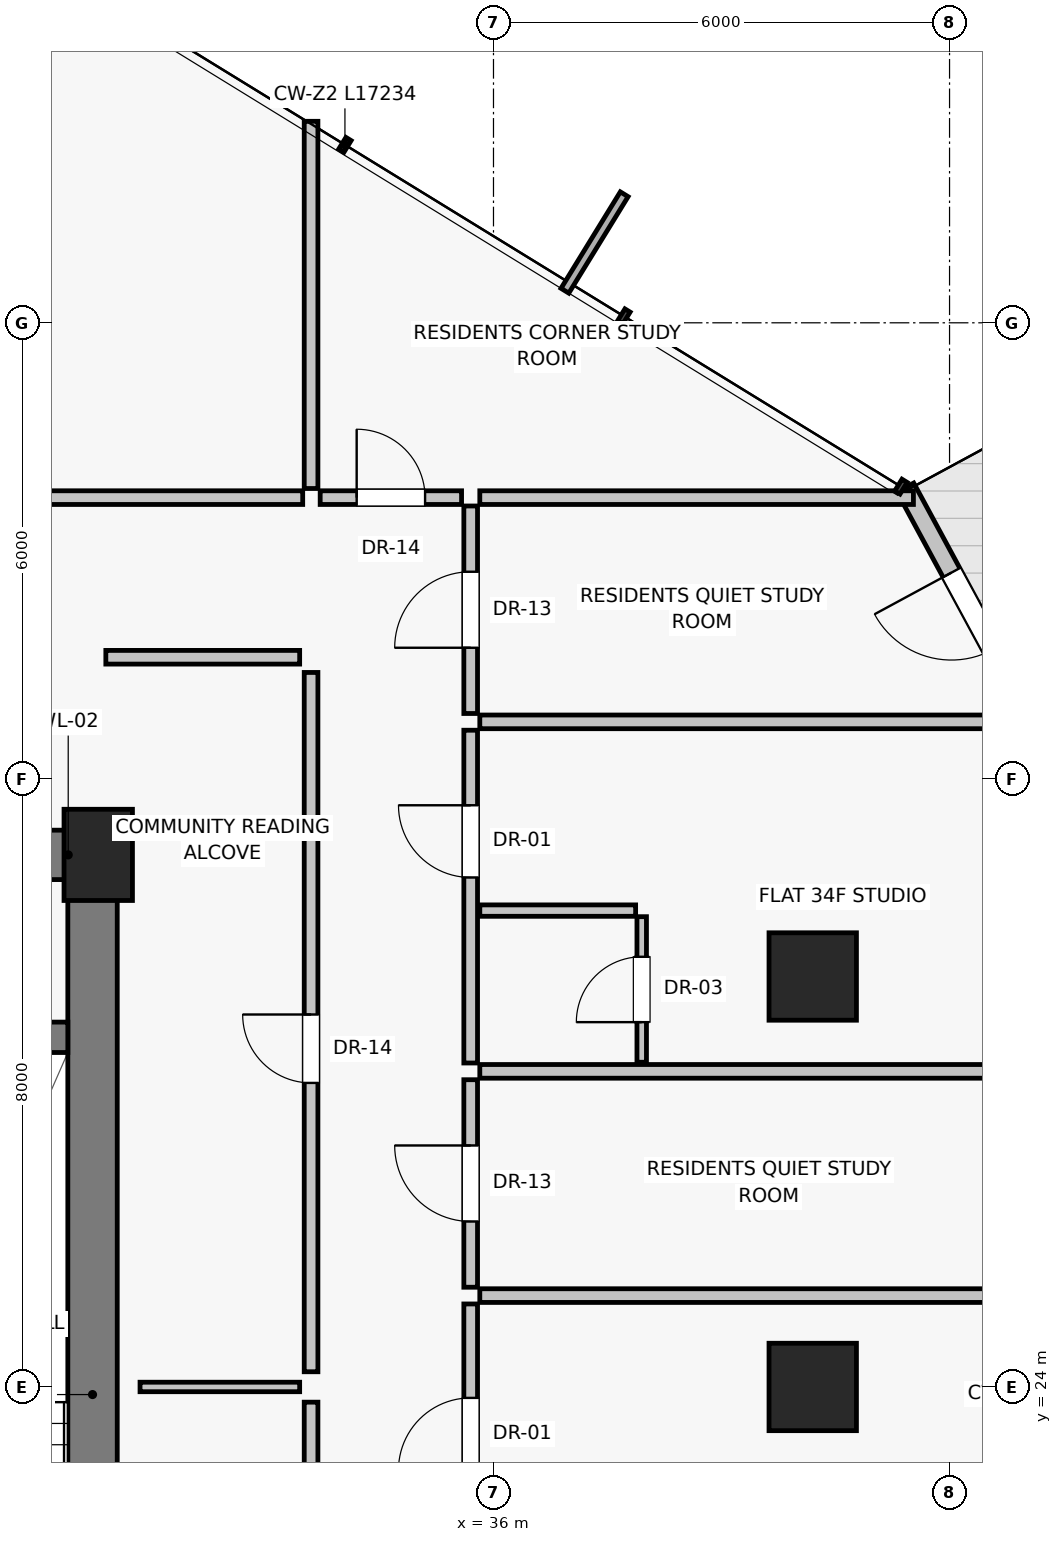
"""IFC4 building model, lengths in metres.
Left out: names, types, materials, properties, quantities, classifications, styles, units other than length and angle.
Written with IfcOpenShell. Run it as: python <this file> out.ifc"""

import sys

from ifc_helpers import new_model, si_unit, direction, frame, frame_2d, origin, origin_2d, place, context, subcontext, project, spatial, rectangle, extrude, source, transform, mapped, element, fill, save


model = new_model("IFC4")
c1 = context("Model", 3, precision=1e-05, world=origin(), true_north=direction((0.0, 1.0)))
c2 = subcontext(c1, "Body", "Model", "MODEL_VIEW")
j1 = project(units=[si_unit("LENGTHUNIT", "METRE"), si_unit("PLANEANGLEUNIT", "RADIAN")], contexts=[c1])
p1 = place(None, origin())
s1 = spatial("IfcSite", under=j1, at=p1, CompositionType="ELEMENT")
p2 = place(p1, origin())
s2 = spatial("IfcBuilding", under=s1, at=p2, CompositionType="ELEMENT")
p3 = place(p2, frame((0.0, 0.0, 123.0)))
s3 = spatial("IfcBuildingStorey", under=s2, at=p3, CompositionType="ELEMENT", Elevation=123.0)
p4 = place(p3, frame((30.8, 31.0, 0.0), z_axis=(0.0, 0.0, 1.0), x_axis=(1.0, 0.0, 0.0)))
e1 = element("IfcColumn", 1, at=p4, inside=s3, PredefinedType="PILASTER", context=c2, shape_type="SweptSolid", body=[
    extrude(rectangle(XDim=0.9, YDim=1.2, at=origin_2d()), origin(), (0.0, 0.0, 1.0), 3.25),
])
for number, where, z_axis, x_axis in (
    (2, (40.2, 24.0, 0.0), (0.0, 0.0, 1.0), (1.0, 0.0, 0.0)),
    (3, (40.2, 29.4, 0.0), (0.0, 0.0, 1.0), (1.0, 0.0, 0.0)),
):
    element("IfcColumn", number, at=place(p3, frame(where, z_axis=z_axis, x_axis=x_axis)), inside=s3, PredefinedType="COLUMN", context=c2, shape_type="SweptSolid", body=[
        extrude(rectangle(XDim=1.15, YDim=1.15, at=origin_2d()), origin(), (0.0, 0.0, 1.0), 3.25),
    ])
p5 = place(p3, frame((43.433, 32.11, 0.0), z_axis=(0.0, 0.0, 1.0), x_axis=(-0.47593195268, 0.879482106934, 0.0)))
e4 = element("IfcWall", 4, at=p5, inside=s3, PredefinedType="SOLIDWALL", context=c2, shape_type="SweptSolid", body=[
    extrude(rectangle(XDim=4.233, YDim=0.25, at=frame_2d((2.117, 0.0))), origin(), (0.0, 0.0, 1.0), 3.0),
])
p6 = place(p5, frame((1.81, 0.0, 0.0)))
e5 = element("IfcOpeningElement", 5, at=p6, cuts=e4, PredefinedType="OPENING", context=c2, shape_type="SweptSolid", body=[
    extrude(rectangle(XDim=1.15, YDim=2.25, at=frame_2d((0.575, 1.125))), frame((0.0, 0.135, 0.0), z_axis=(0.0, -1.0, 0.0), x_axis=(1.0, 0.0, 0.0)), (0.0, 0.0, 1.0), 0.27),
])
p7 = place(p3, frame((30.725, 16.8, 0.0), z_axis=(0.0, 0.0, 1.0), x_axis=(0.0, 1.0, 0.0)))
e6 = element("IfcWall", 6, at=p7, inside=s3, PredefinedType="SHEAR", context=c2, shape_type="SweptSolid", body=[
    extrude(rectangle(XDim=14.2, YDim=0.65, at=frame_2d((7.1, 0.0))), origin(), (0.0, 0.0, 1.0), 3.0),
])
p8 = place(p3, frame((27.0, 31.0, 0.0), z_axis=(0.0, 0.0, 1.0), x_axis=(1.0, 0.0, 0.0)))
e7 = element("IfcWall", 7, at=p8, inside=s3, PredefinedType="SHEAR", context=c2, shape_type="SweptSolid", body=[
    extrude(rectangle(XDim=3.8, YDim=0.65, at=frame_2d((1.9, 0.0))), origin(), (0.0, 0.0, 1.0), 3.0),
])
p9 = place(p8, frame((0.45, 0.0, 0.0)))
e8 = element("IfcOpeningElement", 8, at=p9, cuts=e7, PredefinedType="OPENING", context=c2, shape_type="SweptSolid", body=[
    extrude(rectangle(XDim=0.86, YDim=2.01, at=frame_2d((0.43, 1.005))), frame((0.0, 0.335, 0.0), z_axis=(0.0, -1.0, 0.0), x_axis=(1.0, 0.0, 0.0)), (0.0, 0.0, 1.0), 0.67),
])
p10 = place(p8, frame((1.9, 0.0, 0.0)))
e9 = element("IfcOpeningElement", 9, at=p10, cuts=e7, PredefinedType="OPENING", context=c2, shape_type="SweptSolid", body=[
    extrude(rectangle(XDim=0.86, YDim=2.01, at=frame_2d((0.43, 1.005))), frame((0.0, 0.335, 0.0), z_axis=(0.0, -1.0, 0.0), x_axis=(1.0, 0.0, 0.0)), (0.0, 0.0, 1.0), 0.67),
])
p11 = place(p3, frame((27.0, 28.6, 0.0), z_axis=(0.0, 0.0, 1.0), x_axis=(1.0, 0.0, 0.0)))
e10 = element("IfcWall", 10, at=p11, inside=s3, PredefinedType="SHEAR", context=c2, shape_type="SweptSolid", body=[
    extrude(rectangle(XDim=3.4, YDim=0.4, at=frame_2d((1.7, 0.0))), origin(), (0.0, 0.0, 1.0), 3.0),
])
p12 = place(p3, frame((33.6, 14.4, 0.0), z_axis=(0.0, 0.0, 1.0), x_axis=(0.0, 1.0, 0.0)))
e11 = element("IfcWall", 11, at=p12, inside=s3, PredefinedType="PARTITIONING", context=c2, shape_type="SweptSolid", body=[
    extrude(rectangle(XDim=9.4, YDim=0.18, at=frame_2d((4.7, 0.0))), origin(), (0.0, 0.0, 1.0), 3.0),
])
p13 = place(p12, frame((3.8, 0.0, 0.0)))
e12 = element("IfcOpeningElement", 12, at=p13, cuts=e11, PredefinedType="OPENING", context=c2, shape_type="SweptSolid", body=[
    extrude(rectangle(XDim=0.9, YDim=2.01, at=frame_2d((0.45, 1.005))), frame((0.0, 0.1, 0.0), z_axis=(0.0, -1.0, 0.0), x_axis=(1.0, 0.0, 0.0)), (0.0, 0.0, 1.0), 0.2),
])
p14 = place(p3, frame((33.6, 24.2, 0.0), z_axis=(0.0, 0.0, 1.0), x_axis=(0.0, 1.0, 0.0)))
e13 = element("IfcWall", 13, at=p14, inside=s3, PredefinedType="PARTITIONING", context=c2, shape_type="SweptSolid", body=[
    extrude(rectangle(XDim=9.2, YDim=0.18, at=frame_2d((4.6, 0.0))), origin(), (0.0, 0.0, 1.0), 3.0),
])
p15 = place(p14, frame((3.8, 0.0, 0.0)))
e14 = element("IfcOpeningElement", 14, at=p15, cuts=e13, PredefinedType="OPENING", context=c2, shape_type="SweptSolid", body=[
    extrude(rectangle(XDim=0.9, YDim=2.01, at=frame_2d((0.45, 1.005))), frame((0.0, 0.1, 0.0), z_axis=(0.0, -1.0, 0.0), x_axis=(1.0, 0.0, 0.0)), (0.0, 0.0, 1.0), 0.2),
])
p16 = place(p3, frame((31.35, 24.0, 0.0), z_axis=(0.0, 0.0, 1.0), x_axis=(1.0, 0.0, 0.0)))
e15 = element("IfcWall", 15, at=p16, inside=s3, PredefinedType="PARTITIONING", context=c2, shape_type="SweptSolid", body=[
    extrude(rectangle(XDim=2.1, YDim=0.125, at=frame_2d((1.05, 0.0))), origin(), (0.0, 0.0, 1.0), 3.0),
])
p17 = place(p3, frame((30.9, 33.6, 0.0), z_axis=(0.0, 0.0, 1.0), x_axis=(1.0, 0.0, 0.0)))
e16 = element("IfcWall", 16, at=p17, inside=s3, PredefinedType="PARTITIONING", context=c2, shape_type="SweptSolid", body=[
    extrude(rectangle(XDim=2.55, YDim=0.18, at=frame_2d((1.275, 0.0))), origin(), (0.0, 0.0, 1.0), 3.0),
])
p18 = place(p3, frame((33.6, 35.82, 0.0), z_axis=(0.0, 0.0, 1.0), x_axis=(0.0, 1.0, 0.0)))
e17 = element("IfcWall", 17, at=p18, inside=s3, PredefinedType="PARTITIONING", context=c2, shape_type="SweptSolid", body=[
    extrude(rectangle(XDim=4.831, YDim=0.18, at=frame_2d((2.416, 0.0))), origin(), (0.0, 0.0, 1.0), 3.0),
])
p19 = place(p3, frame((24.654, 35.7, 0.0), z_axis=(0.0, 0.0, 1.0), x_axis=(1.0, 0.0, 0.0)))
e18 = element("IfcWall", 18, at=p19, inside=s3, PredefinedType="PARTITIONING", context=c2, shape_type="SweptSolid", body=[
    extrude(rectangle(XDim=8.836, YDim=0.18, at=frame_2d((4.418, 0.0))), origin(), (0.0, 0.0, 1.0), 2.58),
])
p20 = place(p19, frame((3.918, 0.0, 0.0)))
e19 = element("IfcOpeningElement", 19, at=p20, cuts=e18, PredefinedType="OPENING", context=c2, shape_type="SweptSolid", body=[
    extrude(rectangle(XDim=1.0, YDim=2.01, at=frame_2d((0.5, 1.005))), frame((0.0, 0.1, 0.0), z_axis=(0.0, -1.0, 0.0), x_axis=(1.0, 0.0, 0.0)), (0.0, 0.0, 1.0), 0.2),
])
p21 = place(p3, frame((35.82, 35.7, 0.0), z_axis=(0.0, 0.0, 1.0), x_axis=(1.0, 0.0, 0.0)))
e20 = element("IfcWall", 20, at=p21, inside=s3, PredefinedType="PARTITIONING", context=c2, shape_type="SweptSolid", body=[
    extrude(rectangle(XDim=5.705, YDim=0.18, at=frame_2d((2.852, 0.0))), origin(), (0.0, 0.0, 1.0), 3.0),
])
p22 = place(p3, frame((35.7, 25.312, 0.0), z_axis=(0.0, 0.0, 1.0), x_axis=(0.0, 1.0, 0.0)))
e21 = element("IfcWall", 21, at=p22, inside=s3, PredefinedType="PARTITIONING", context=c2, shape_type="SweptSolid", body=[
    extrude(rectangle(XDim=2.73, YDim=0.18, at=frame_2d((1.365, 0.0))), origin(), (0.0, 0.0, 1.0), 2.58),
])
p23 = place(p22, frame((0.865, 0.0, 0.0)))
e22 = element("IfcOpeningElement", 22, at=p23, cuts=e21, PredefinedType="OPENING", context=c2, shape_type="SweptSolid", body=[
    extrude(rectangle(XDim=1.0, YDim=2.01, at=frame_2d((0.5, 1.005))), frame((0.0, 0.1, 0.0), z_axis=(0.0, -1.0, 0.0), x_axis=(1.0, 0.0, 0.0)), (0.0, 0.0, 1.0), 0.2),
])
p24 = place(p3, frame((35.82, 25.202, 0.0), z_axis=(0.0, 0.0, 1.0), x_axis=(1.0, 0.0, 0.0)))
e23 = element("IfcWall", 23, at=p24, inside=s3, PredefinedType="PARTITIONING", context=c2, shape_type="SweptSolid", body=[
    extrude(rectangle(XDim=7.433, YDim=0.18, at=frame_2d((3.716, 0.0))), origin(), (0.0, 0.0, 1.0), 3.0),
])
p25 = place(p3, frame((35.7, 19.758, 0.0), z_axis=(0.0, 0.0, 1.0), x_axis=(0.0, 1.0, 0.0)))
e24 = element("IfcWall", 24, at=p25, inside=s3, PredefinedType="PARTITIONING", context=c2, shape_type="SweptSolid", body=[
    extrude(rectangle(XDim=5.334, YDim=0.18, at=frame_2d((2.667, 0.0))), origin(), (0.0, 0.0, 1.0), 2.58),
])
p26 = place(p25, frame((3.148, 0.0, 0.0)))
e25 = element("IfcOpeningElement", 25, at=p26, cuts=e24, PredefinedType="OPENING", context=c2, shape_type="SweptSolid", body=[
    extrude(rectangle(XDim=0.95, YDim=2.02, at=frame_2d((0.475, 1.01))), frame((0.0, 0.1, 0.0), z_axis=(0.0, -1.0, 0.0), x_axis=(1.0, 0.0, 0.0)), (0.0, 0.0, 1.0), 0.2),
])
p27 = place(p3, frame((35.82, 28.152, 0.0), z_axis=(0.0, 0.0, 1.0), x_axis=(1.0, 0.0, 0.0)))
e26 = element("IfcWall", 26, at=p27, inside=s3, PredefinedType="PARTITIONING", context=c2, shape_type="SweptSolid", body=[
    extrude(rectangle(XDim=7.514, YDim=0.18, at=frame_2d((3.757, 0.0))), origin(), (0.0, 0.0, 1.0), 3.0),
])
p28 = place(p3, frame((35.7, 32.86, 0.0), z_axis=(0.0, 0.0, 1.0), x_axis=(0.0, 1.0, 0.0)))
e27 = element("IfcWall", 27, at=p28, inside=s3, PredefinedType="PARTITIONING", context=c2, shape_type="SweptSolid", body=[
    extrude(rectangle(XDim=2.73, YDim=0.18, at=frame_2d((1.365, 0.0))), origin(), (0.0, 0.0, 1.0), 3.0),
])
p29 = place(p28, frame((0.865, 0.0, 0.0)))
e28 = element("IfcOpeningElement", 28, at=p29, cuts=e27, PredefinedType="OPENING", context=c2, shape_type="SweptSolid", body=[
    extrude(rectangle(XDim=1.0, YDim=2.01, at=frame_2d((0.5, 1.005))), frame((0.0, 0.1, 0.0), z_axis=(0.0, -1.0, 0.0), x_axis=(1.0, 0.0, 0.0)), (0.0, 0.0, 1.0), 0.2),
])
p30 = place(p3, frame((35.82, 32.75, 0.0), z_axis=(0.0, 0.0, 1.0), x_axis=(1.0, 0.0, 0.0)))
e29 = element("IfcWall", 29, at=p30, inside=s3, PredefinedType="PARTITIONING", context=c2, shape_type="SweptSolid", body=[
    extrude(rectangle(XDim=7.301, YDim=0.18, at=frame_2d((3.65, 0.0))), origin(), (0.0, 0.0, 1.0), 3.0),
])
p31 = place(p3, frame((35.7, 28.262, 0.0), z_axis=(0.0, 0.0, 1.0), x_axis=(0.0, 1.0, 0.0)))
e30 = element("IfcWall", 30, at=p31, inside=s3, PredefinedType="PARTITIONING", context=c2, shape_type="SweptSolid", body=[
    extrude(rectangle(XDim=4.378, YDim=0.18, at=frame_2d((2.189, 0.0))), origin(), (0.0, 0.0, 1.0), 2.58),
])
p32 = place(p31, frame((2.441, 0.0, 0.0)))
e31 = element("IfcOpeningElement", 31, at=p32, cuts=e30, PredefinedType="OPENING", context=c2, shape_type="SweptSolid", body=[
    extrude(rectangle(XDim=0.95, YDim=2.02, at=frame_2d((0.475, 1.01))), frame((0.0, 0.1, 0.0), z_axis=(0.0, -1.0, 0.0), x_axis=(1.0, 0.0, 0.0)), (0.0, 0.0, 1.0), 0.2),
])
p33 = place(p3, frame((35.82, 30.267, 0.0), z_axis=(0.0, 0.0, 1.0), x_axis=(1.0, 0.0, 0.0)))
e32 = element("IfcWall", 32, at=p33, inside=s3, PredefinedType="PARTITIONING", context=c2, shape_type="SweptSolid", body=[
    extrude(rectangle(XDim=2.05, YDim=0.15, at=frame_2d((1.025, 0.0))), origin(), (0.0, 0.0, 1.0), 2.378),
])
p34 = place(p3, frame((37.95, 28.272, 0.0), z_axis=(0.0, 0.0, 1.0), x_axis=(0.0, 1.0, 0.0)))
e33 = element("IfcWall", 33, at=p34, inside=s3, PredefinedType="PARTITIONING", context=c2, shape_type="SweptSolid", body=[
    extrude(rectangle(XDim=1.915, YDim=0.125, at=frame_2d((0.958, 0.0))), origin(), (0.0, 0.0, 1.0), 3.0),
])
p35 = place(p34, frame((0.528, 0.0, 0.0)))
e34 = element("IfcOpeningElement", 34, at=p35, cuts=e33, PredefinedType="OPENING", context=c2, shape_type="SweptSolid", body=[
    extrude(rectangle(XDim=0.86, YDim=2.01, at=frame_2d((0.43, 1.005))), frame((0.0, 0.073, 0.0), z_axis=(0.0, -1.0, 0.0), x_axis=(1.0, 0.0, 0.0)), (0.0, 0.0, 1.0), 0.145),
])
p36 = place(p3, frame((33.72, 35.7, 0.0), z_axis=(0.0, 0.0, 1.0), x_axis=(1.0, 0.0, 0.0)))
e35 = element("IfcWall", 35, at=p36, inside=s3, PredefinedType="PARTITIONING", context=c2, shape_type="SweptSolid", body=[
    extrude(rectangle(XDim=1.86, YDim=0.18, at=frame_2d((0.93, 0.0))), origin(), (0.0, 0.0, 1.0), 3.0),
])
p37 = place(p36, frame((0.48, 0.0, 0.0)))
e36 = element("IfcOpeningElement", 36, at=p37, cuts=e35, PredefinedType="OPENING", context=c2, shape_type="SweptSolid", body=[
    extrude(rectangle(XDim=0.9, YDim=2.01, at=frame_2d((0.45, 1.005))), frame((0.0, 0.1, 0.0), z_axis=(0.0, -1.0, 0.0), x_axis=(1.0, 0.0, 0.0)), (0.0, 0.0, 1.0), 0.2),
])
m1 = source(origin(), c2, "Body", "SweptSolid", [
    extrude(rectangle(XDim=1.15, YDim=2.25, at=frame_2d((0.575, 1.125))), frame((0.0, 0.025, 0.0), z_axis=(0.0, -1.0, 0.0), x_axis=(1.0, 0.0, 0.0)), (0.0, 0.0, 1.0), 0.05),
])
p38 = place(p6, frame((1.15, 0.0, 0.0), z_axis=(0.0, 0.0, 1.0), x_axis=(-1.0, 0.0, 0.0)))
e37 = element("IfcDoor", 37, at=p38, inside=s3, OperationType="SINGLE_SWING_RIGHT", PredefinedType="DOOR", context=c2, shape_type="MappedRepresentation", body=[
    mapped(m1, transform((0.0, 0.0, 0.0), scale=1.0)),
])
fill(e5, e37)
m2 = source(origin(), c2, "Body", "SweptSolid", [
    extrude(rectangle(XDim=0.9, YDim=2.01, at=frame_2d((0.45, 1.005))), frame((0.0, 0.025, 0.0), z_axis=(0.0, -1.0, 0.0), x_axis=(1.0, 0.0, 0.0)), (0.0, 0.0, 1.0), 0.05),
])
p39 = place(p15, origin())
e38 = element("IfcDoor", 38, at=p39, inside=s3, OperationType="SINGLE_SWING_RIGHT", PredefinedType="DOOR", context=c2, shape_type="MappedRepresentation", body=[
    mapped(m2, transform((0.0, 0.0, 0.0), scale=1.0)),
])
fill(e14, e38)
m3 = source(origin(), c2, "Body", "SweptSolid", [
    extrude(rectangle(XDim=1.0, YDim=2.01, at=frame_2d((0.5, 1.005))), frame((0.0, 0.025, 0.0), z_axis=(0.0, -1.0, 0.0), x_axis=(1.0, 0.0, 0.0)), (0.0, 0.0, 1.0), 0.05),
])
p40 = place(p23, origin())
e39 = element("IfcDoor", 39, at=p40, inside=s3, OperationType="SINGLE_SWING_RIGHT", PredefinedType="DOOR", context=c2, shape_type="MappedRepresentation", body=[
    mapped(m3, transform((0.0, 0.0, 0.0), scale=1.0)),
])
fill(e22, e39)
m4 = source(origin(), c2, "Body", "SweptSolid", [
    extrude(rectangle(XDim=0.95, YDim=2.02, at=frame_2d((0.475, 1.01))), frame((0.0, 0.025, 0.0), z_axis=(0.0, -1.0, 0.0), x_axis=(1.0, 0.0, 0.0)), (0.0, 0.0, 1.0), 0.05),
])
p41 = place(p26, origin())
e40 = element("IfcDoor", 40, at=p41, inside=s3, OperationType="SINGLE_SWING_LEFT", PredefinedType="DOOR", context=c2, shape_type="MappedRepresentation", body=[
    mapped(m4, transform((0.0, 0.0, 0.0), scale=1.0)),
])
fill(e25, e40)
p42 = place(p29, origin())
e41 = element("IfcDoor", 41, at=p42, inside=s3, OperationType="SINGLE_SWING_LEFT", PredefinedType="DOOR", context=c2, shape_type="MappedRepresentation", body=[
    mapped(m3, transform((0.0, 0.0, 0.0), scale=1.0)),
])
fill(e28, e41)
p43 = place(p32, origin())
e42 = element("IfcDoor", 42, at=p43, inside=s3, OperationType="SINGLE_SWING_RIGHT", PredefinedType="DOOR", context=c2, shape_type="MappedRepresentation", body=[
    mapped(m4, transform((0.0, 0.0, 0.0), scale=1.0)),
])
fill(e31, e42)
m5 = source(origin(), c2, "Body", "SweptSolid", [
    extrude(rectangle(XDim=0.86, YDim=2.01, at=frame_2d((0.43, 1.005))), frame((0.0, 0.025, 0.0), z_axis=(0.0, -1.0, 0.0), x_axis=(1.0, 0.0, 0.0)), (0.0, 0.0, 1.0), 0.05),
])
p44 = place(p35, origin())
e43 = element("IfcDoor", 43, at=p44, inside=s3, OperationType="SINGLE_SWING_LEFT", PredefinedType="DOOR", context=c2, shape_type="MappedRepresentation", body=[
    mapped(m5, transform((0.0, 0.0, 0.0), scale=1.0)),
])
fill(e34, e43)
p45 = place(p37, origin())
e44 = element("IfcDoor", 44, at=p45, inside=s3, OperationType="SINGLE_SWING_LEFT", PredefinedType="DOOR", context=c2, shape_type="MappedRepresentation", body=[
    mapped(m2, transform((0.0, 0.0, 0.0), scale=1.0)),
])
fill(e36, e44)
save(model, sys.argv[1])
